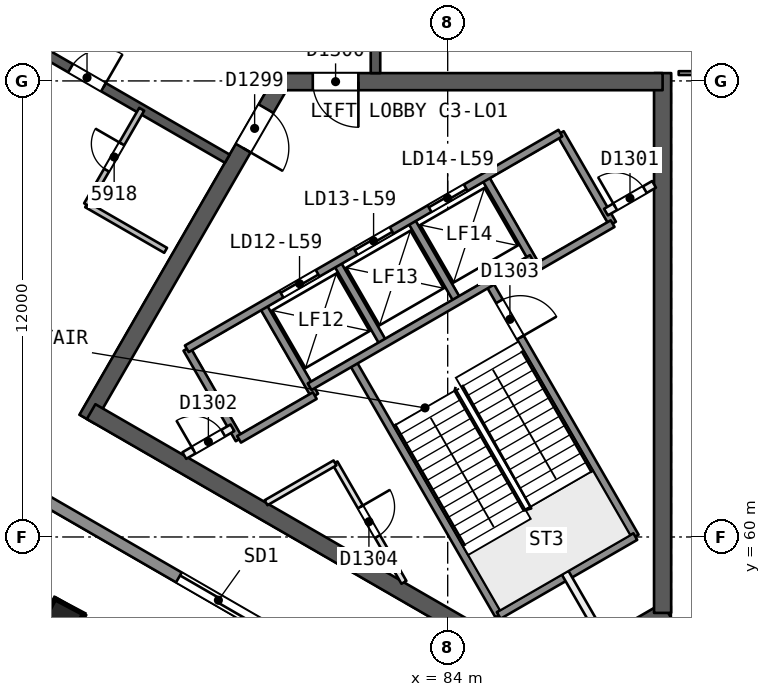
"""IFC4 building model, lengths in metres.
Left out: names, types, materials, properties, quantities, classifications, styles, units other than length and angle.
Written with IfcOpenShell. Run it as: python <this file> out.ifc"""

import sys

from ifc_helpers import new_model, si_unit, direction, frame, frame_2d, origin, origin_2d, place, context, subcontext, project, spatial, rectangle, extrude, element, fill, save


model = new_model("IFC4")
c1 = context("Model", 3, precision=1e-05, world=origin(), true_north=direction((0.0, 1.0)))
c2 = subcontext(c1, "Body", "Model", "MODEL_VIEW")
j1 = project(units=[si_unit("LENGTHUNIT", "METRE"), si_unit("PLANEANGLEUNIT", "RADIAN")], contexts=[c1])
p1 = place(None, origin())
s1 = spatial("IfcSite", under=j1, at=p1, CompositionType="ELEMENT")
p2 = place(p1, origin())
s2 = spatial("IfcBuilding", under=s1, at=p2, CompositionType="ELEMENT")
p3 = place(p2, frame((0.0, 0.0, 239.1)))
s3 = spatial("IfcBuildingStorey", under=s2, at=p3, CompositionType="ELEMENT", Elevation=239.1)
p4 = place(p3, frame((79.63, 71.981, 0.0), z_axis=(0.0, 0.0, 1.0), x_axis=(-0.500002171595, -0.86602415001, 0.0)))
e1 = element("IfcWall", 1, at=p4, inside=s3, PredefinedType="SHEAR", context=c2, shape_type="SweptSolid", body=[
    extrude(rectangle(XDim=10.25, YDim=0.45, at=frame_2d((5.125, 0.0))), origin(), (0.0, 0.0, 1.0), 3.7),
])
p5 = place(p4, frame((0.82, 0.0, 0.0)))
e2 = element("IfcOpeningElement", 2, at=p5, cuts=e1, PredefinedType="OPENING", context=c2, shape_type="SweptSolid", body=[
    extrude(rectangle(XDim=1.2, YDim=2.1, at=frame_2d((0.6, 1.05))), frame((0.0, 0.235, 0.0), z_axis=(0.0, -1.0, 0.0), x_axis=(1.0, 0.0, 0.0)), (0.0, 0.0, 1.0), 0.471),
])
p6 = place(p3, frame((74.617, 63.299, 0.0), z_axis=(0.0, 0.0, 1.0), x_axis=(0.86602594008, -0.499999071108, 0.0)))
e3 = element("IfcWall", 3, at=p6, inside=s3, PredefinedType="SHEAR", context=c2, shape_type="SweptSolid", body=[
    extrude(rectangle(XDim=14.108, YDim=0.45, at=frame_2d((7.054, 0.0))), origin(), (0.0, 0.0, 1.0), 3.7),
])
p7 = place(p3, frame((86.723, 56.31, 0.0), z_axis=(0.0, 0.0, 1.0), x_axis=(0.866042179588, 0.49997094233, 0.0)))
e4 = element("IfcWall", 4, at=p7, inside=s3, PredefinedType="SHEAR", context=c2, shape_type="SweptSolid", body=[
    extrude(rectangle(XDim=3.515, YDim=0.45, at=frame_2d((1.758, 0.0))), origin(), (0.0, 0.0, 1.0), 3.7),
])
p8 = place(p3, frame((89.655, 58.002, 0.0), z_axis=(0.0, 0.0, 1.0), x_axis=(0.0, 1.0, 0.0)))
e5 = element("IfcWall", 5, at=p8, inside=s3, PredefinedType="SHEAR", context=c2, shape_type="SweptSolid", body=[
    extrude(rectangle(XDim=14.204, YDim=0.45, at=frame_2d((7.102, 0.0))), origin(), (0.0, 0.0, 1.0), 3.7),
])
p9 = place(p3, frame((89.655, 71.981, 0.0), z_axis=(0.0, 0.0, 1.0), x_axis=(-1.0, 0.0, 0.0)))
e6 = element("IfcWall", 6, at=p9, inside=s3, PredefinedType="SHEAR", context=c2, shape_type="SweptSolid", body=[
    extrude(rectangle(XDim=10.155, YDim=0.45, at=frame_2d((5.078, 0.0))), origin(), (0.0, 0.0, 1.0), 3.7),
])
p10 = place(p9, frame((8.005, 0.0, 0.0)))
e7 = element("IfcOpeningElement", 7, at=p10, cuts=e6, PredefinedType="OPENING", context=c2, shape_type="SweptSolid", body=[
    extrude(rectangle(XDim=1.2, YDim=2.1, at=frame_2d((0.6, 1.05))), frame((0.0, 0.235, 0.0), z_axis=(0.0, -1.0, 0.0), x_axis=(1.0, 0.0, 0.0)), (0.0, 0.0, 1.0), 0.471),
])
p11 = place(p3, frame((82.1, 72.206, 0.0), z_axis=(0.0, 0.0, 1.0), x_axis=(0.0, 1.0, 0.0)))
e8 = element("IfcWall", 8, at=p11, inside=s3, PredefinedType="SHEAR", context=c2, shape_type="SweptSolid", body=[
    extrude(rectangle(XDim=15.588, YDim=0.25, at=frame_2d((7.794, 0.0))), origin(), (0.0, 0.0, 1.0), 3.3),
])
p12 = place(p11, frame((1.527, 0.0, 0.0)))
e9 = element("IfcOpeningElement", 9, at=p12, cuts=e8, PredefinedType="OPENING", context=c2, shape_type="SweptSolid", body=[
    extrude(rectangle(XDim=1.0, YDim=2.1, at=frame_2d((0.5, 1.05))), frame((0.0, 0.135, 0.0), z_axis=(0.0, -1.0, 0.0), x_axis=(1.0, 0.0, 0.0)), (0.0, 0.0, 1.0), 0.271),
])
p13 = place(p11, frame((5.396, 0.0, 0.0)))
e10 = element("IfcOpeningElement", 10, at=p13, cuts=e8, PredefinedType="OPENING", context=c2, shape_type="SweptSolid", body=[
    extrude(rectangle(XDim=0.9, YDim=2.1, at=frame_2d((0.45, 1.05))), frame((0.0, 0.135, 0.0), z_axis=(0.0, -1.0, 0.0), x_axis=(1.0, 0.0, 0.0)), (0.0, 0.0, 1.0), 0.271),
])
p14 = place(p11, frame((8.981, 0.0, 0.0)))
e11 = element("IfcOpeningElement", 11, at=p14, cuts=e8, PredefinedType="OPENING", context=c2, shape_type="SweptSolid", body=[
    extrude(rectangle(XDim=0.9, YDim=2.1, at=frame_2d((0.45, 1.05))), frame((0.0, 0.135, 0.0), z_axis=(0.0, -1.0, 0.0), x_axis=(1.0, 0.0, 0.0)), (0.0, 0.0, 1.0), 0.271),
])
p15 = place(p11, frame((12.906, 0.0, 0.0)))
e12 = element("IfcOpeningElement", 12, at=p15, cuts=e8, PredefinedType="OPENING", context=c2, shape_type="SweptSolid", body=[
    extrude(rectangle(XDim=1.0, YDim=2.1, at=frame_2d((0.5, 1.05))), frame((0.0, 0.135, 0.0), z_axis=(0.0, -1.0, 0.0), x_axis=(1.0, 0.0, 0.0)), (0.0, 0.0, 1.0), 0.271),
])
p16 = place(p3, frame((64.7, 77.748, 0.0), z_axis=(0.0, 0.0, 1.0), x_axis=(0.866026492143, -0.499998114903, 0.0)))
e13 = element("IfcWall", 13, at=p16, inside=s3, PredefinedType="SHEAR", context=c2, shape_type="SweptSolid", body=[
    extrude(rectangle(XDim=15.588, YDim=0.25, at=frame_2d((7.794, 0.0))), origin(), (0.0, 0.0, 1.0), 3.3),
])
p17 = place(p16, frame((3.45, 0.0, 0.0)))
e14 = element("IfcOpeningElement", 14, at=p17, cuts=e13, PredefinedType="OPENING", context=c2, shape_type="SweptSolid", body=[
    extrude(rectangle(XDim=1.0, YDim=2.1, at=frame_2d((0.5, 1.05))), frame((0.0, 0.135, 0.0), z_axis=(0.0, -1.0, 0.0), x_axis=(1.0, 0.0, 0.0)), (0.0, 0.0, 1.0), 0.271),
])
p18 = place(p16, frame((8.315, 0.0, 0.0)))
e15 = element("IfcOpeningElement", 15, at=p18, cuts=e13, PredefinedType="OPENING", context=c2, shape_type="SweptSolid", body=[
    extrude(rectangle(XDim=1.1, YDim=2.1, at=frame_2d((0.55, 1.05))), frame((0.0, 0.135, 0.0), z_axis=(0.0, -1.0, 0.0), x_axis=(1.0, 0.0, 0.0)), (0.0, 0.0, 1.0), 0.271),
])
p19 = place(p16, frame((10.827, 0.0, 0.0)))
e16 = element("IfcOpeningElement", 16, at=p19, cuts=e13, PredefinedType="OPENING", context=c2, shape_type="SweptSolid", body=[
    extrude(rectangle(XDim=1.0, YDim=2.1, at=frame_2d((0.5, 1.05))), frame((0.0, 0.135, 0.0), z_axis=(0.0, -1.0, 0.0), x_axis=(1.0, 0.0, 0.0)), (0.0, 0.0, 1.0), 0.271),
])
p20 = place(p3, frame((73.841, 57.773, 0.0), z_axis=(0.000857578916, 0.022824792675, 0.999739112668), x_axis=(-0.499938956565, -0.865825126557, 0.020196285069)))
e17 = element("IfcColumn", 17, at=p20, inside=s3, PredefinedType="COLUMN", context=c2, shape_type="SweptSolid", body=[
    extrude(rectangle(XDim=0.85, YDim=0.85, at=origin_2d()), origin(), (0.0, 0.0, 1.0), 3.701),
])
p21 = place(p3, frame((90.079, 72.206, 0.0), z_axis=(0.0, 0.0, 1.0), x_axis=(1.0, 0.0, 0.0)))
e18 = element("IfcWall", 18, at=p21, inside=s3, PredefinedType="PARTITIONING", context=c2, shape_type="SweptSolid", body=[
    extrude(rectangle(XDim=2.05, YDim=0.1, at=frame_2d((1.025, 0.0))), origin(), (0.0, 0.0, 1.0), 3.3),
])
p22 = place(p21, frame((0.575, 0.0, 0.0)))
e19 = element("IfcOpeningElement", 19, at=p22, cuts=e18, PredefinedType="OPENING", context=c2, shape_type="SweptSolid", body=[
    extrude(rectangle(XDim=0.9, YDim=2.1, at=frame_2d((0.45, 1.05))), frame((0.0, 0.061, 0.0), z_axis=(0.0, -1.0, 0.0), x_axis=(1.0, 0.0, 0.0)), (0.0, 0.0, 1.0), 0.121),
])
p23 = place(p3, frame((76.578, 67.542, 0.0), z_axis=(0.0, 0.0, 1.0), x_axis=(-0.866038271014, 0.499977712642, 0.0)))
e20 = element("IfcWall", 20, at=p23, inside=s3, PredefinedType="PARTITIONING", context=c2, shape_type="SweptSolid", body=[
    extrude(rectangle(XDim=2.401, YDim=0.15, at=frame_2d((1.2, 0.0))), origin(), (0.0, 0.0, 1.0), 3.3),
])
p24 = place(p3, frame((74.498, 68.743, 0.0), z_axis=(0.0, 0.0, 1.0), x_axis=(0.499987231761, 0.866032775405, 0.0)))
e21 = element("IfcWall", 21, at=p24, inside=s3, PredefinedType="PARTITIONING", context=c2, shape_type="SweptSolid", body=[
    extrude(rectangle(XDim=2.9, YDim=0.15, at=frame_2d((1.45, 0.0))), origin(), (0.0, 0.0, 1.0), 3.3),
])
p25 = place(p24, frame((1.05, 0.0, 0.0)))
e22 = element("IfcOpeningElement", 22, at=p25, cuts=e21, PredefinedType="OPENING", context=c2, shape_type="SweptSolid", body=[
    extrude(rectangle(XDim=0.8, YDim=2.1, at=frame_2d((0.4, 1.05))), frame((0.0, 0.085, 0.0), z_axis=(0.0, -1.0, 0.0), x_axis=(1.0, 0.0, 0.0)), (0.0, 0.0, 1.0), 0.171),
])
p26 = place(p3, frame((87.876, 52.614, 0.0), z_axis=(0.0, 0.0, 1.0), x_axis=(-0.866025459945, 0.499999902727, 0.0)))
e23 = element("IfcWall", 23, at=p26, inside=s3, PredefinedType="SOLIDWALL", context=c2, shape_type="SweptSolid", body=[
    extrude(rectangle(XDim=49.688, YDim=0.3, at=frame_2d((24.844, 0.0))), origin(), (0.0, 0.0, 1.0), 3.3),
])
p27 = place(p26, frame((23.956, 0.0, 0.0)))
e24 = element("IfcOpeningElement", 24, at=p27, cuts=e23, PredefinedType="OPENING", context=c2, shape_type="SweptSolid", body=[
    extrude(rectangle(XDim=2.4, YDim=2.4, at=frame_2d((1.2, 1.2))), frame((0.0, 0.161, 0.0), z_axis=(0.0, -1.0, 0.0), x_axis=(1.0, 0.0, 0.0)), (0.0, 0.0, 1.0), 0.321),
])
p28 = place(p26, frame((37.357, 0.0, 0.0)))
e25 = element("IfcOpeningElement", 25, at=p28, cuts=e23, PredefinedType="OPENING", context=c2, shape_type="SweptSolid", body=[
    extrude(rectangle(XDim=2.4, YDim=2.4, at=frame_2d((1.2, 1.2))), frame((0.0, 0.161, 0.0), z_axis=(0.0, -1.0, 0.0), x_axis=(1.0, 0.0, 0.0)), (0.0, 0.0, 1.0), 0.321),
])
p29 = place(p26, frame((10.243, 0.0, 0.0)))
e26 = element("IfcOpeningElement", 26, at=p29, cuts=e23, PredefinedType="OPENING", context=c2, shape_type="SweptSolid", body=[
    extrude(rectangle(XDim=2.4, YDim=2.4, at=frame_2d((1.2, 1.2))), frame((0.0, 0.161, 0.0), z_axis=(0.0, -1.0, 0.0), x_axis=(1.0, 0.0, 0.0)), (0.0, 0.0, 1.0), 0.321),
])
p30 = place(p3, frame((77.135, 64.952, 0.0), z_axis=(0.0, 0.0, 1.0), x_axis=(0.499996545922, -0.866027397988, 0.0)))
e27 = element("IfcWall", 27, at=p30, inside=s3, PredefinedType="SOLIDWALL", context=c2, shape_type="SweptSolid", body=[
    extrude(rectangle(XDim=2.75, YDim=0.2, at=frame_2d((1.375, 0.0))), origin(), (0.0, 0.0, 1.0), 3.3),
])
p31 = place(p3, frame((81.034, 61.949, 0.0), z_axis=(0.0, 0.0, 1.0), x_axis=(0.499945732631, -0.866056732798, 0.0)))
e28 = element("IfcWall", 28, at=p31, inside=s3, PredefinedType="PARTITIONING", context=c2, shape_type="SweptSolid", body=[
    extrude(rectangle(XDim=3.628, YDim=0.15, at=frame_2d((1.814, 0.0))), origin(), (0.0, 0.0, 1.0), 3.3),
])
p32 = place(p31, frame((1.337, 0.0, 0.0)))
e29 = element("IfcOpeningElement", 29, at=p32, cuts=e28, PredefinedType="OPENING", context=c2, shape_type="SweptSolid", body=[
    extrude(rectangle(XDim=0.9, YDim=2.1, at=frame_2d((0.45, 1.05))), frame((0.0, 0.085, 0.0), z_axis=(0.0, -1.0, 0.0), x_axis=(1.0, 0.0, 0.0)), (0.0, 0.0, 1.0), 0.171),
])
p33 = place(p3, frame((79.127, 66.102, 0.0), z_axis=(0.0, 0.0, 1.0), x_axis=(0.499996545922, -0.866027397988, 0.0)))
e30 = element("IfcWall", 30, at=p33, inside=s3, PredefinedType="SOLIDWALL", context=c2, shape_type="SweptSolid", body=[
    extrude(rectangle(XDim=2.75, YDim=0.2, at=frame_2d((1.375, 0.0))), origin(), (0.0, 0.0, 1.0), 3.3),
])
p34 = place(p3, frame((81.493, 64.604, 0.0), z_axis=(0.0, 0.0, 1.0), x_axis=(0.500006057782, -0.866021906294, 0.0)))
e31 = element("IfcWall", 31, at=p34, inside=s3, PredefinedType="SOLIDWALL", context=c2, shape_type="SweptSolid", body=[
    extrude(rectangle(XDim=7.7, YDim=0.2, at=frame_2d((3.85, 0.0))), origin(), (0.0, 0.0, 1.0), 3.3),
])
p35 = place(p3, frame((81.076, 67.227, 0.0), z_axis=(0.0, 0.0, 1.0), x_axis=(0.50000366821, -0.866023285932, 0.0)))
e32 = element("IfcWall", 32, at=p35, inside=s3, PredefinedType="SOLIDWALL", context=c2, shape_type="SweptSolid", body=[
    extrude(rectangle(XDim=2.48, YDim=0.2, at=frame_2d((1.24, 0.0))), origin(), (0.0, 0.0, 1.0), 3.3),
])
p36 = place(p3, frame((87.09, 59.06, 0.0), z_axis=(0.0, 0.0, 1.0), x_axis=(0.500011643316, -0.866018681408, 0.0)))
e33 = element("IfcWall", 33, at=p36, inside=s3, PredefinedType="PARTITIONING", context=c2, shape_type="SweptSolid", body=[
    extrude(rectangle(XDim=1.973, YDim=0.2, at=frame_2d((0.987, 0.0))), origin(), (0.0, 0.0, 1.0), 3.3),
])
p37 = place(p3, frame((83.024, 68.352, 0.0), z_axis=(0.0, 0.0, 1.0), x_axis=(0.50000366821, -0.866023285932, 0.0)))
e34 = element("IfcWall", 34, at=p37, inside=s3, PredefinedType="SOLIDWALL", context=c2, shape_type="SweptSolid", body=[
    extrude(rectangle(XDim=2.48, YDim=0.2, at=frame_2d((1.24, 0.0))), origin(), (0.0, 0.0, 1.0), 3.3),
])
p38 = place(p3, frame((85.087, 66.679, 0.0), z_axis=(0.0, 0.0, 1.0), x_axis=(0.500019787375, -0.866013979237, 0.0)))
e35 = element("IfcWall", 35, at=p38, inside=s3, PredefinedType="SOLIDWALL", context=c2, shape_type="SweptSolid", body=[
    extrude(rectangle(XDim=7.7, YDim=0.2, at=frame_2d((3.85, 0.0))), origin(), (0.0, 0.0, 1.0), 3.3),
])
p39 = place(p38, frame((0.55, 0.0, 0.0)))
e36 = element("IfcOpeningElement", 36, at=p39, cuts=e35, PredefinedType="OPENING", context=c2, shape_type="SweptSolid", body=[
    extrude(rectangle(XDim=1.1, YDim=2.1, at=frame_2d((0.55, 1.05))), frame((0.0, 0.11, 0.0), z_axis=(0.0, -1.0, 0.0), x_axis=(1.0, 0.0, 0.0)), (0.0, 0.0, 1.0), 0.221),
])
for number, where, z_axis, x_axis in (
    (37, (84.973, 69.477, 0.0), (0.0, 0.0, 1.0), (0.5, -0.866, 0.0)),
    (38, (86.965, 70.626, 0.0), (0.0, 0.0, 1.0), (0.5, -0.866, 0.0)),
):
    element("IfcWall", number, at=place(p3, frame(where, z_axis=z_axis, x_axis=x_axis)), inside=s3, PredefinedType="SOLIDWALL", context=c2, shape_type="SweptSolid", body=[
        extrude(rectangle(XDim=2.75, YDim=0.2, at=frame_2d((1.375, 0.0))), origin(), (0.0, 0.0, 1.0), 3.3),
    ])
p40 = place(p3, frame((77.135, 64.952, 0.0), z_axis=(0.0, 0.0, 1.0), x_axis=(0.866031916153, 0.499988720078, 0.0)))
e39 = element("IfcWall", 39, at=p40, inside=s3, PredefinedType="SOLIDWALL", context=c2, shape_type="SweptSolid", body=[
    extrude(rectangle(XDim=11.35, YDim=0.2, at=frame_2d((5.675, 0.0))), origin(), (0.0, 0.0, 1.0), 3.3),
])
p41 = place(p40, frame((2.875, 0.0, 0.0)))
e40 = element("IfcOpeningElement", 40, at=p41, cuts=e39, PredefinedType="OPENING", context=c2, shape_type="SweptSolid", body=[
    extrude(rectangle(XDim=1.1, YDim=2.1, at=frame_2d((0.55, 1.05))), frame((0.0, 0.11, 0.0), z_axis=(0.0, -1.0, 0.0), x_axis=(1.0, 0.0, 0.0)), (0.0, 0.0, 1.0), 0.221),
])
p42 = place(p40, frame((5.125, 0.0, 0.0)))
e41 = element("IfcOpeningElement", 41, at=p42, cuts=e39, PredefinedType="OPENING", context=c2, shape_type="SweptSolid", body=[
    extrude(rectangle(XDim=1.1, YDim=2.1, at=frame_2d((0.55, 1.05))), frame((0.0, 0.11, 0.0), z_axis=(0.0, -1.0, 0.0), x_axis=(1.0, 0.0, 0.0)), (0.0, 0.0, 1.0), 0.221),
])
p43 = place(p40, frame((7.375, 0.0, 0.0)))
e42 = element("IfcOpeningElement", 42, at=p43, cuts=e39, PredefinedType="OPENING", context=c2, shape_type="SweptSolid", body=[
    extrude(rectangle(XDim=1.1, YDim=2.1, at=frame_2d((0.55, 1.05))), frame((0.0, 0.11, 0.0), z_axis=(0.0, -1.0, 0.0), x_axis=(1.0, 0.0, 0.0)), (0.0, 0.0, 1.0), 0.221),
])
p44 = place(p3, frame((77.07, 62.143, 0.0), z_axis=(0.0, 0.0, 1.0), x_axis=(0.866013036001, 0.500021421018, 0.0)))
e43 = element("IfcWall", 43, at=p44, inside=s3, PredefinedType="PARTITIONING", context=c2, shape_type="SweptSolid", body=[
    extrude(rectangle(XDim=1.461, YDim=0.2, at=frame_2d((0.73, 0.0))), origin(), (0.0, 0.0, 1.0), 3.3),
])
p45 = place(p44, frame((0.281, 0.0, 0.0)))
e44 = element("IfcOpeningElement", 44, at=p45, cuts=e43, PredefinedType="OPENING", context=c2, shape_type="SweptSolid", body=[
    extrude(rectangle(XDim=0.9, YDim=2.1, at=frame_2d((0.45, 1.05))), frame((0.0, 0.11, 0.0), z_axis=(0.0, -1.0, 0.0), x_axis=(1.0, 0.0, 0.0)), (0.0, 0.0, 1.0), 0.221),
])
p46 = place(p3, frame((88.165, 68.548, 0.0), z_axis=(0.0, 0.0, 1.0), x_axis=(0.866013036001, 0.500021421018, 0.0)))
e45 = element("IfcWall", 45, at=p46, inside=s3, PredefinedType="PARTITIONING", context=c2, shape_type="SweptSolid", body=[
    extrude(rectangle(XDim=1.461, YDim=0.2, at=frame_2d((0.73, 0.0))), origin(), (0.0, 0.0, 1.0), 3.3),
])
p47 = place(p46, frame((0.281, 0.0, 0.0)))
e46 = element("IfcOpeningElement", 46, at=p47, cuts=e45, PredefinedType="OPENING", context=c2, shape_type="SweptSolid", body=[
    extrude(rectangle(XDim=0.9, YDim=2.1, at=frame_2d((0.45, 1.05))), frame((0.0, 0.11, 0.0), z_axis=(0.0, -1.0, 0.0), x_axis=(1.0, 0.0, 0.0)), (0.0, 0.0, 1.0), 0.221),
])
p48 = place(p3, frame((80.367, 63.954, 0.0), z_axis=(0.0, 0.0, 1.0), x_axis=(0.866026575979, 0.499997969693, 0.0)))
e47 = element("IfcWall", 47, at=p48, inside=s3, PredefinedType="SOLIDWALL", context=c2, shape_type="SweptSolid", body=[
    extrude(rectangle(XDim=6.75, YDim=0.2, at=frame_2d((3.375, 0.0))), origin(), (0.0, 0.0, 1.0), 3.3),
])
p49 = place(p3, frame((78.51, 62.57, 0.0), z_axis=(0.0, 0.0, 1.0), x_axis=(0.866053019151, 0.499952165731, 0.0)))
e48 = element("IfcWall", 48, at=p49, inside=s3, PredefinedType="SOLIDWALL", context=c2, shape_type="SweptSolid", body=[
    extrude(rectangle(XDim=2.3, YDim=0.2, at=frame_2d((1.15, 0.0))), origin(), (0.0, 0.0, 1.0), 3.3),
])
p50 = place(p3, frame((86.348, 67.095, 0.0), z_axis=(0.0, 0.0, 1.0), x_axis=(0.86602648383, 0.499998129301, 0.0)))
e49 = element("IfcWall", 49, at=p50, inside=s3, PredefinedType="SOLIDWALL", context=c2, shape_type="SweptSolid", body=[
    extrude(rectangle(XDim=2.3, YDim=0.2, at=frame_2d((1.15, 0.0))), origin(), (0.0, 0.0, 1.0), 3.3),
])
p51 = place(p3, frame((79.22, 60.901, 0.0), z_axis=(0.0, 0.0, 1.0), x_axis=(0.866040030748, 0.499974664501, 0.0)))
e50 = element("IfcWall", 50, at=p51, inside=s3, PredefinedType="PARTITIONING", context=c2, shape_type="SweptSolid", body=[
    extrude(rectangle(XDim=2.095, YDim=0.15, at=frame_2d((1.047, 0.0))), origin(), (0.0, 0.0, 1.0), 3.3),
])
p52 = place(p3, frame((85.343, 57.935, 0.0), z_axis=(0.0, 0.0, 1.0), x_axis=(0.866004344652, 0.500036473714, 0.0)))
e51 = element("IfcWall", 51, at=p52, inside=s3, PredefinedType="SOLIDWALL", context=c2, shape_type="SweptSolid", body=[
    extrude(rectangle(XDim=4.15, YDim=0.2, at=frame_2d((2.075, 0.0))), origin(), (0.0, 0.0, 1.0), 3.3),
])
p53 = place(p25, origin())
e52 = element("IfcDoor", 52, at=p53, inside=s3, OperationType="SINGLE_SWING_RIGHT", PredefinedType="NOTDEFINED", context=c2, shape_type="SweptSolid", body=[
    extrude(rectangle(XDim=0.8, YDim=2.1, at=frame_2d((0.4, 1.05))), frame((0.0, 0.025, 0.0), z_axis=(0.0, -1.0, 0.0), x_axis=(1.0, 0.0, 0.0)), (0.0, 0.0, 1.0), 0.05),
])
fill(e22, e52)
p54 = place(p19, origin())
e53 = element("IfcDoor", 53, at=p54, inside=s3, OperationType="SINGLE_SWING_RIGHT", PredefinedType="NOTDEFINED", context=c2, shape_type="SweptSolid", body=[
    extrude(rectangle(XDim=1.0, YDim=2.1, at=frame_2d((0.5, 1.05))), frame((0.0, 0.025, 0.0), z_axis=(0.0, -1.0, 0.0), x_axis=(1.0, 0.0, 0.0)), (0.0, 0.0, 1.0), 0.05),
])
fill(e16, e53)
p55 = place(p29, origin())
e54 = element("IfcDoor", 54, at=p55, inside=s3, OperationType="SLIDING_TO_LEFT", PredefinedType="NOTDEFINED", context=c2, shape_type="SweptSolid", body=[
    extrude(rectangle(XDim=2.4, YDim=2.4, at=frame_2d((1.2, 1.2))), frame((0.0, 0.025, 0.0), z_axis=(0.0, -1.0, 0.0), x_axis=(1.0, 0.0, 0.0)), (0.0, 0.0, 1.0), 0.05),
])
fill(e26, e54)
p56 = place(p5, origin())
e55 = element("IfcDoor", 55, at=p56, inside=s3, OperationType="SINGLE_SWING_RIGHT", PredefinedType="NOTDEFINED", context=c2, shape_type="SweptSolid", body=[
    extrude(rectangle(XDim=1.2, YDim=2.1, at=frame_2d((0.6, 1.05))), frame((0.0, 0.025, 0.0), z_axis=(0.0, -1.0, 0.0), x_axis=(1.0, 0.0, 0.0)), (0.0, 0.0, 1.0), 0.05),
])
fill(e2, e55)
p57 = place(p10, origin())
e56 = element("IfcDoor", 56, at=p57, inside=s3, OperationType="SINGLE_SWING_LEFT", PredefinedType="NOTDEFINED", context=c2, shape_type="SweptSolid", body=[
    extrude(rectangle(XDim=1.2, YDim=2.1, at=frame_2d((0.6, 1.05))), frame((0.0, 0.025, 0.0), z_axis=(0.0, -1.0, 0.0), x_axis=(1.0, 0.0, 0.0)), (0.0, 0.0, 1.0), 0.05),
])
fill(e7, e56)
p58 = place(p41, origin())
e57 = element("IfcDoor", 57, at=p58, inside=s3, OperationType="SLIDING_TO_LEFT", PredefinedType="NOTDEFINED", context=c2, shape_type="SweptSolid", body=[
    extrude(rectangle(XDim=1.1, YDim=2.1, at=frame_2d((0.55, 1.05))), frame((0.0, 0.025, 0.0), z_axis=(0.0, -1.0, 0.0), x_axis=(1.0, 0.0, 0.0)), (0.0, 0.0, 1.0), 0.05),
])
fill(e40, e57)
p59 = place(p42, origin())
e58 = element("IfcDoor", 58, at=p59, inside=s3, OperationType="SLIDING_TO_RIGHT", PredefinedType="NOTDEFINED", context=c2, shape_type="SweptSolid", body=[
    extrude(rectangle(XDim=1.1, YDim=2.1, at=frame_2d((0.55, 1.05))), frame((0.0, 0.025, 0.0), z_axis=(0.0, -1.0, 0.0), x_axis=(1.0, 0.0, 0.0)), (0.0, 0.0, 1.0), 0.05),
])
fill(e41, e58)
p60 = place(p43, origin())
e59 = element("IfcDoor", 59, at=p60, inside=s3, OperationType="SLIDING_TO_LEFT", PredefinedType="NOTDEFINED", context=c2, shape_type="SweptSolid", body=[
    extrude(rectangle(XDim=1.1, YDim=2.1, at=frame_2d((0.55, 1.05))), frame((0.0, 0.025, 0.0), z_axis=(0.0, -1.0, 0.0), x_axis=(1.0, 0.0, 0.0)), (0.0, 0.0, 1.0), 0.05),
])
fill(e42, e59)
p61 = place(p47, origin())
e60 = element("IfcDoor", 60, at=p61, inside=s3, OperationType="SINGLE_SWING_LEFT", PredefinedType="NOTDEFINED", context=c2, shape_type="SweptSolid", body=[
    extrude(rectangle(XDim=0.9, YDim=2.1, at=frame_2d((0.45, 1.05))), frame((0.0, 0.025, 0.0), z_axis=(0.0, -1.0, 0.0), x_axis=(1.0, 0.0, 0.0)), (0.0, 0.0, 1.0), 0.05),
])
fill(e46, e60)
p62 = place(p45, origin())
e61 = element("IfcDoor", 61, at=p62, inside=s3, OperationType="SINGLE_SWING_LEFT", PredefinedType="NOTDEFINED", context=c2, shape_type="SweptSolid", body=[
    extrude(rectangle(XDim=0.9, YDim=2.1, at=frame_2d((0.45, 1.05))), frame((0.0, 0.025, 0.0), z_axis=(0.0, -1.0, 0.0), x_axis=(1.0, 0.0, 0.0)), (0.0, 0.0, 1.0), 0.05),
])
fill(e44, e61)
p63 = place(p39, origin())
e62 = element("IfcDoor", 62, at=p63, inside=s3, OperationType="SINGLE_SWING_RIGHT", PredefinedType="NOTDEFINED", context=c2, shape_type="SweptSolid", body=[
    extrude(rectangle(XDim=1.1, YDim=2.1, at=frame_2d((0.55, 1.05))), frame((0.0, 0.025, 0.0), z_axis=(0.0, -1.0, 0.0), x_axis=(1.0, 0.0, 0.0)), (0.0, 0.0, 1.0), 0.05),
])
fill(e36, e62)
p64 = place(p32, origin())
e63 = element("IfcDoor", 63, at=p64, inside=s3, OperationType="SINGLE_SWING_LEFT", PredefinedType="NOTDEFINED", context=c2, shape_type="SweptSolid", body=[
    extrude(rectangle(XDim=0.9, YDim=2.1, at=frame_2d((0.45, 1.05))), frame((0.0, 0.025, 0.0), z_axis=(0.0, -1.0, 0.0), x_axis=(1.0, 0.0, 0.0)), (0.0, 0.0, 1.0), 0.05),
])
fill(e29, e63)
save(model, sys.argv[1])
